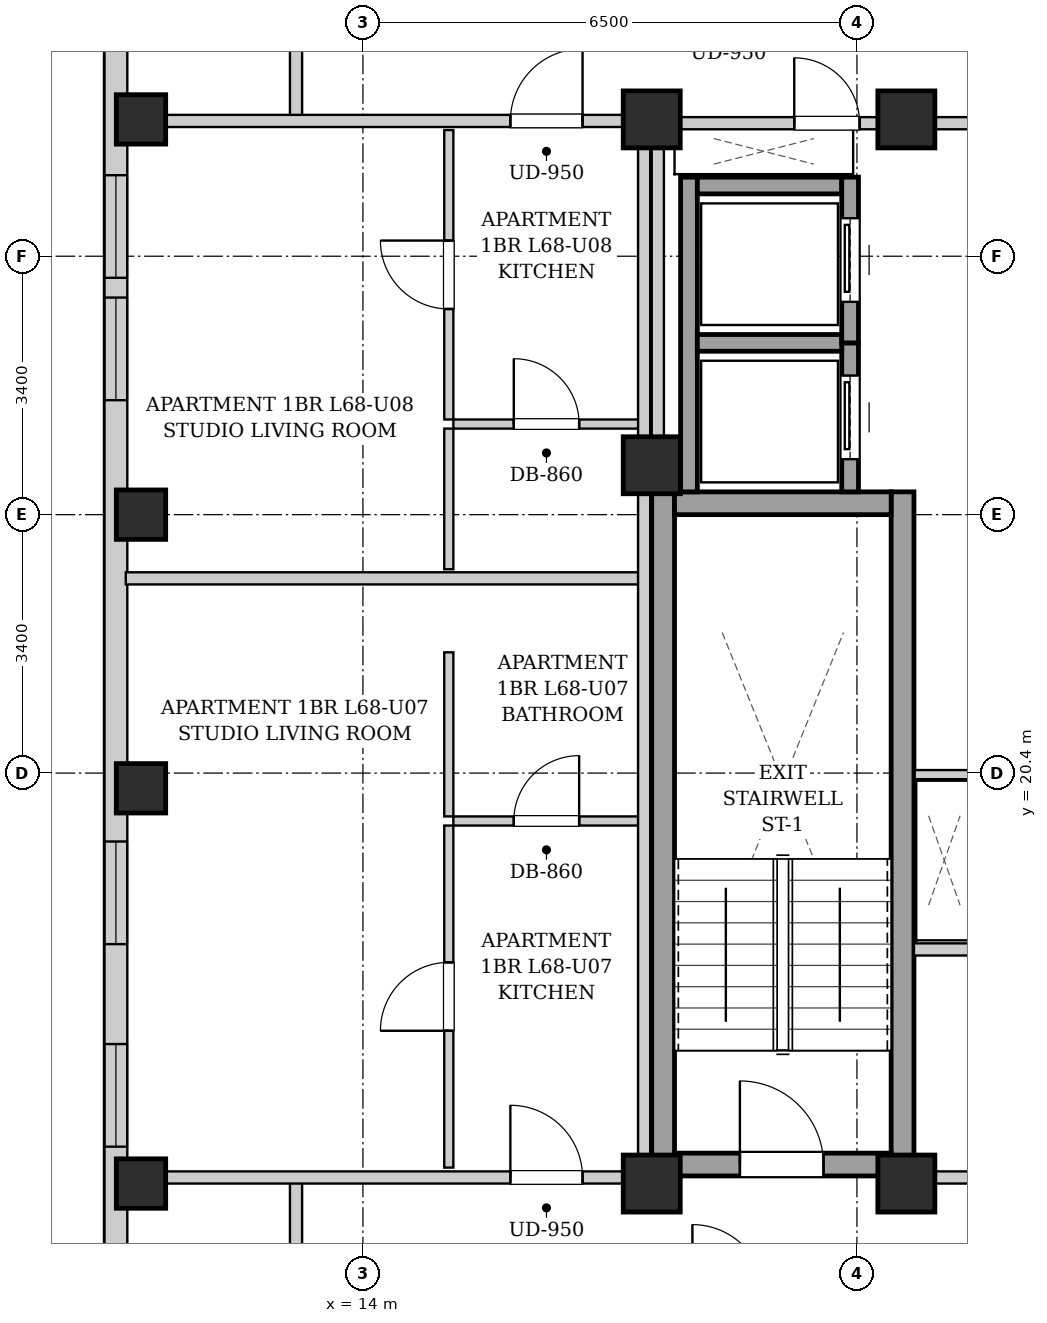
"""IFC4 building model, lengths in metres.
Left out: names, types, materials, properties, quantities, classifications, styles, units other than length and angle.
Written with IfcOpenShell. Run it as: python <this file> out.ifc"""

import sys

from ifc_helpers import new_model, si_unit, direction, frame, frame_2d, origin, origin_2d, place, context, subcontext, project, spatial, rectangle, extrude, element, fill, save


model = new_model("IFC4")
c1 = context("Model", 3, precision=1e-05, world=origin(), true_north=direction((0.0, 1.0)))
c2 = subcontext(c1, "Body", "Model", "MODEL_VIEW")
j1 = project(units=[si_unit("LENGTHUNIT", "METRE"), si_unit("PLANEANGLEUNIT", "RADIAN")], contexts=[c1])
p1 = place(None, origin())
s1 = spatial("IfcSite", under=j1, at=p1, CompositionType="ELEMENT")
p2 = place(p1, origin())
s2 = spatial("IfcBuilding", under=s1, at=p2, CompositionType="ELEMENT")
p3 = place(p2, frame((0.0, 0.0, 234.3)))
s3 = spatial("IfcBuildingStorey", under=s2, at=p3, CompositionType="ELEMENT", Elevation=234.3)
for number, where, z_axis, x_axis in (
    (1, (11.08, 15.0, 0.0), (0.0, 0.0, 1.0), (1.0, 0.0, 0.0)),
    (2, (11.08, 20.2, 0.0), (0.0, 0.0, 1.0), (1.0, 0.0, 0.0)),
    (3, (11.08, 23.8, 0.0), (0.0, 0.0, 1.0), (1.0, 0.0, 0.0)),
    (4, (11.08, 29.0, 0.0), (0.0, 0.0, 1.0), (1.0, 0.0, 0.0)),
):
    element("IfcColumn", number, at=place(p3, frame(where, z_axis=z_axis, x_axis=x_axis)), inside=s3, PredefinedType="COLUMN", context=c2, shape_type="SweptSolid", body=[
        extrude(rectangle(XDim=0.65, YDim=0.65, at=origin_2d()), origin(), (0.0, 0.0, 1.0), 3.4),
    ])
for number, where, z_axis, x_axis in (
    (5, (17.8, 15.0, 0.0), (0.0, 0.0, 1.0), (1.0, 0.0, 0.0)),
    (6, (21.15, 15.0, 0.0), (0.0, 0.0, 1.0), (1.0, 0.0, 0.0)),
    (7, (17.8, 29.0, 0.0), (0.0, 0.0, 1.0), (1.0, 0.0, 0.0)),
    (8, (21.15, 29.0, 0.0), (0.0, 0.0, 1.0), (1.0, 0.0, 0.0)),
    (9, (17.8, 24.45, 0.0), (0.0, 0.0, 1.0), (1.0, 0.0, 0.0)),
):
    element("IfcColumn", number, at=place(p3, frame(where, z_axis=z_axis, x_axis=x_axis)), inside=s3, PredefinedType="COLUMN", context=c2, shape_type="SweptSolid", body=[
        extrude(rectangle(XDim=0.75, YDim=0.75, at=origin_2d()), origin(), (0.0, 0.0, 1.0), 3.4),
    ])
p4 = place(p3, frame((10.75, 6.3, 0.0), z_axis=(0.0, 0.0, 1.0), x_axis=(0.0, 1.0, 0.0)))
e10 = element("IfcWall", 10, at=p4, inside=s3, PredefinedType="SOLIDWALL", context=c2, shape_type="SweptSolid", body=[
    extrude(rectangle(XDim=31.4, YDim=0.3, at=frame_2d((15.7, 0.0))), origin(), (0.0, 0.0, 1.0), 3.14),
])
p5 = place(p4, frame((28.546, 0.0, 0.55)))
e11 = element("IfcOpeningElement", 11, at=p5, cuts=e10, PredefinedType="OPENING", context=c2, shape_type="SweptSolid", body=[
    extrude(rectangle(XDim=1.35, YDim=1.2, at=frame_2d((0.675, 0.6))), frame((0.0, 0.16, 0.0), z_axis=(0.0, -1.0, 0.0), x_axis=(1.0, 0.0, 0.0)), (0.0, 0.0, 1.0), 0.32),
])
p6 = place(p4, frame((11.85, 0.0, 0.55)))
e12 = element("IfcOpeningElement", 12, at=p6, cuts=e10, PredefinedType="OPENING", context=c2, shape_type="SweptSolid", body=[
    extrude(rectangle(XDim=1.35, YDim=1.2, at=frame_2d((0.675, 0.6))), frame((0.0, 0.16, 0.0), z_axis=(0.0, -1.0, 0.0), x_axis=(1.0, 0.0, 0.0)), (0.0, 0.0, 1.0), 0.32),
])
p7 = place(p4, frame((9.185, 0.0, 0.55)))
e13 = element("IfcOpeningElement", 13, at=p7, cuts=e10, PredefinedType="OPENING", context=c2, shape_type="SweptSolid", body=[
    extrude(rectangle(XDim=1.35, YDim=1.2, at=frame_2d((0.675, 0.6))), frame((0.0, 0.16, 0.0), z_axis=(0.0, -1.0, 0.0), x_axis=(1.0, 0.0, 0.0)), (0.0, 0.0, 1.0), 0.32),
])
p8 = place(p4, frame((19.006, 0.0, 0.55)))
e14 = element("IfcOpeningElement", 14, at=p8, cuts=e10, PredefinedType="OPENING", context=c2, shape_type="SweptSolid", body=[
    extrude(rectangle(XDim=1.35, YDim=1.2, at=frame_2d((0.675, 0.6))), frame((0.0, 0.16, 0.0), z_axis=(0.0, -1.0, 0.0), x_axis=(1.0, 0.0, 0.0)), (0.0, 0.0, 1.0), 0.32),
])
p9 = place(p4, frame((20.616, 0.0, 0.55)))
e15 = element("IfcOpeningElement", 15, at=p9, cuts=e10, PredefinedType="OPENING", context=c2, shape_type="SweptSolid", body=[
    extrude(rectangle(XDim=1.35, YDim=1.2, at=frame_2d((0.675, 0.6))), frame((0.0, 0.16, 0.0), z_axis=(0.0, -1.0, 0.0), x_axis=(1.0, 0.0, 0.0)), (0.0, 0.0, 1.0), 0.32),
])
for number, where, z_axis, x_axis in (
    (16, (17.95, 15.1, 0.0), (0.0, 0.0, 1.0), (0.0, 1.0, 0.0)),
    (17, (21.1, 15.1, 0.0), (0.0, 0.0, 1.0), (0.0, 1.0, 0.0)),
):
    element("IfcWall", number, at=place(p3, frame(where, z_axis=z_axis, x_axis=x_axis)), inside=s3, PredefinedType="SHEAR", context=c2, shape_type="SweptSolid", body=[
        extrude(rectangle(XDim=9.0, YDim=0.3, at=frame_2d((4.5, 0.0))), origin(), (0.0, 0.0, 1.0), 3.14),
    ])
p10 = place(p3, frame((18.1, 23.95, 0.0), z_axis=(0.0, 0.0, 1.0), x_axis=(1.0, 0.0, 0.0)))
e18 = element("IfcWall", 18, at=p10, inside=s3, PredefinedType="SHEAR", context=c2, shape_type="SweptSolid", body=[
    extrude(rectangle(XDim=2.85, YDim=0.3, at=frame_2d((1.425, 0.0))), origin(), (0.0, 0.0, 1.0), 3.14),
])
p11 = place(p3, frame((18.1, 15.25, 0.0), z_axis=(0.0, 0.0, 1.0), x_axis=(1.0, 0.0, 0.0)))
e19 = element("IfcWall", 19, at=p11, inside=s3, PredefinedType="SHEAR", context=c2, shape_type="SweptSolid", body=[
    extrude(rectangle(XDim=2.85, YDim=0.3, at=frame_2d((1.425, 0.0))), origin(), (0.0, 0.0, 1.0), 3.14),
])
p12 = place(p11, frame((0.86, 0.0, 0.0)))
e20 = element("IfcOpeningElement", 20, at=p12, cuts=e19, PredefinedType="OPENING", context=c2, shape_type="SweptSolid", body=[
    extrude(rectangle(XDim=1.1, YDim=2.05, at=frame_2d((0.55, 1.025))), frame((0.0, 0.16, 0.0), z_axis=(0.0, -1.0, 0.0), x_axis=(1.0, 0.0, 0.0)), (0.0, 0.0, 1.0), 0.32),
])
p13 = place(p3, frame((18.29, 24.1, 0.0), z_axis=(0.0, 0.0, 1.0), x_axis=(0.0, 1.0, 0.0)))
e21 = element("IfcWall", 21, at=p13, inside=s3, PredefinedType="SHEAR", context=c2, shape_type="SweptSolid", body=[
    extrude(rectangle(XDim=4.14, YDim=0.22, at=frame_2d((2.07, 0.0))), origin(), (0.0, 0.0, 1.0), 3.14),
])
p14 = place(p3, frame((20.41, 24.1, 0.0), z_axis=(0.0, 0.0, 1.0), x_axis=(0.0, 1.0, 0.0)))
e22 = element("IfcWall", 22, at=p14, inside=s3, PredefinedType="SHEAR", context=c2, shape_type="SweptSolid", body=[
    extrude(rectangle(XDim=1.96, YDim=0.22, at=frame_2d((0.98, 0.0))), origin(), (0.0, 0.0, 1.0), 3.14),
])
p15 = place(p14, frame((0.43, 0.0, 0.0)))
e23 = element("IfcOpeningElement", 23, at=p15, cuts=e22, PredefinedType="OPENING", context=c2, shape_type="SweptSolid", body=[
    extrude(rectangle(XDim=1.1, YDim=2.15, at=frame_2d((0.55, 1.075))), frame((0.0, 0.12, 0.0), z_axis=(0.0, -1.0, 0.0), x_axis=(1.0, 0.0, 0.0)), (0.0, 0.0, 1.0), 0.24),
])
for number, where, z_axis, x_axis in (
    (24, (18.4, 26.06, 0.0), (0.0, 0.0, 1.0), (1.0, 0.0, 0.0)),
    (25, (18.4, 28.13, 0.0), (0.0, 0.0, 1.0), (1.0, 0.0, 0.0)),
):
    element("IfcWall", number, at=place(p3, frame(where, z_axis=z_axis, x_axis=x_axis)), inside=s3, PredefinedType="SHEAR", context=c2, shape_type="SweptSolid", body=[
        extrude(rectangle(XDim=1.9, YDim=0.22, at=frame_2d((0.95, 0.0))), origin(), (0.0, 0.0, 1.0), 3.14),
    ])
p16 = place(p3, frame((20.41, 26.06, 0.0), z_axis=(0.0, 0.0, 1.0), x_axis=(0.0, 1.0, 0.0)))
e26 = element("IfcWall", 26, at=p16, inside=s3, PredefinedType="SHEAR", context=c2, shape_type="SweptSolid", body=[
    extrude(rectangle(XDim=2.18, YDim=0.22, at=frame_2d((1.09, 0.0))), origin(), (0.0, 0.0, 1.0), 3.14),
])
p17 = place(p16, frame((0.54, 0.0, 0.0)))
e27 = element("IfcOpeningElement", 27, at=p17, cuts=e26, PredefinedType="OPENING", context=c2, shape_type="SweptSolid", body=[
    extrude(rectangle(XDim=1.1, YDim=2.15, at=frame_2d((0.55, 1.075))), frame((0.0, 0.12, 0.0), z_axis=(0.0, -1.0, 0.0), x_axis=(1.0, 0.0, 0.0)), (0.0, 0.0, 1.0), 0.24),
])
p18 = place(p3, frame((21.25, 15.08, 0.0), z_axis=(0.0, 0.0, 1.0), x_axis=(1.0, 0.0, 0.0)))
e28 = element("IfcWall", 28, at=p18, inside=s3, PredefinedType="PARTITIONING", context=c2, shape_type="SweptSolid", body=[
    extrude(rectangle(XDim=8.5, YDim=0.16, at=frame_2d((4.25, 0.0))), origin(), (0.0, 0.0, 1.0), 2.668),
])
p19 = place(p18, frame((3.725, 0.0, 0.0)))
e29 = element("IfcOpeningElement", 29, at=p19, cuts=e28, PredefinedType="OPENING", context=c2, shape_type="SweptSolid", body=[
    extrude(rectangle(XDim=1.05, YDim=2.05, at=frame_2d((0.525, 1.025))), frame((0.0, 0.09, 0.0), z_axis=(0.0, -1.0, 0.0), x_axis=(1.0, 0.0, 0.0)), (0.0, 0.0, 1.0), 0.18),
])
p20 = place(p3, frame((21.25, 18.08, 0.0), z_axis=(0.0, 0.0, 1.0), x_axis=(1.0, 0.0, 0.0)))
e30 = element("IfcWall", 30, at=p20, inside=s3, PredefinedType="PARTITIONING", context=c2, shape_type="SweptSolid", body=[
    extrude(rectangle(XDim=1.1, YDim=0.16, at=frame_2d((0.55, 0.0))), origin(), (0.0, 0.0, 1.0), 3.14),
])
p21 = place(p3, frame((17.88, 24.12, 0.0), z_axis=(0.0, 0.0, 1.0), x_axis=(0.0, 1.0, 0.0)))
e31 = element("IfcWall", 31, at=p21, inside=s3, PredefinedType="PARTITIONING", context=c2, shape_type="SweptSolid", body=[
    extrude(rectangle(XDim=4.76, YDim=0.16, at=frame_2d((2.38, 0.0))), origin(), (0.0, 0.0, 1.0), 3.14),
])
p22 = place(p3, frame((17.96, 28.95, 0.0), z_axis=(0.0, 0.0, 1.0), x_axis=(1.0, 0.0, 0.0)))
e32 = element("IfcWall", 32, at=p22, inside=s3, PredefinedType="PARTITIONING", context=c2, shape_type="SweptSolid", body=[
    extrude(rectangle(XDim=4.29, YDim=0.16, at=frame_2d((2.145, 0.0))), origin(), (0.0, 0.0, 1.0), 2.668),
])
p23 = place(p22, frame((1.715, 0.0, 0.0)))
e33 = element("IfcOpeningElement", 33, at=p23, cuts=e32, PredefinedType="OPENING", context=c2, shape_type="SweptSolid", body=[
    extrude(rectangle(XDim=0.86, YDim=2.05, at=frame_2d((0.43, 1.025))), frame((0.0, 0.09, 0.0), z_axis=(0.0, -1.0, 0.0), x_axis=(1.0, 0.0, 0.0)), (0.0, 0.0, 1.0), 0.18),
])
p24 = place(p3, frame((22.28, 20.38, 0.0), z_axis=(0.0, 0.0, 1.0), x_axis=(-1.0, 0.0, 0.0)))
e34 = element("IfcWall", 34, at=p24, inside=s3, PredefinedType="PARTITIONING", context=c2, shape_type="SweptSolid", body=[
    extrude(rectangle(XDim=1.02, YDim=0.12, at=frame_2d((0.51, 0.0))), origin(), (0.0, 0.0, 1.0), 3.14),
])
for number, where, z_axis, x_axis in (
    (35, (13.12, 13.51, 0.0), (0.0, 0.0, 1.0), (0.0, 1.0, 0.0)),
    (36, (13.12, 28.98, 0.0), (0.0, 0.0, 1.0), (0.0, 1.0, 0.0)),
):
    element("IfcWall", number, at=place(p3, frame(where, z_axis=z_axis, x_axis=x_axis)), inside=s3, PredefinedType="PARTITIONING", context=c2, shape_type="SweptSolid", body=[
        extrude(rectangle(XDim=1.58, YDim=0.16, at=frame_2d((0.79, 0.0))), origin(), (0.0, 0.0, 1.0), 3.14),
    ])
p25 = place(p3, frame((10.88, 15.08, 0.0), z_axis=(0.0, 0.0, 1.0), x_axis=(1.0, 0.0, 0.0)))
e37 = element("IfcWall", 37, at=p25, inside=s3, PredefinedType="PARTITIONING", context=c2, shape_type="SweptSolid", body=[
    extrude(rectangle(XDim=6.88, YDim=0.16, at=frame_2d((3.44, 0.0))), origin(), (0.0, 0.0, 1.0), 2.668),
])
p26 = place(p25, frame((5.06, 0.0, 0.0)))
e38 = element("IfcOpeningElement", 38, at=p26, cuts=e37, PredefinedType="OPENING", context=c2, shape_type="SweptSolid", body=[
    extrude(rectangle(XDim=0.95, YDim=2.1, at=frame_2d((0.475, 1.05))), frame((0.0, 0.09, 0.0), z_axis=(0.0, -1.0, 0.0), x_axis=(1.0, 0.0, 0.0)), (0.0, 0.0, 1.0), 0.18),
])
p27 = place(p3, frame((10.88, 22.962, 0.0), z_axis=(0.0, 0.0, 1.0), x_axis=(1.0, 0.0, 0.0)))
e39 = element("IfcWall", 39, at=p27, inside=s3, PredefinedType="PARTITIONING", context=c2, shape_type="SweptSolid", body=[
    extrude(rectangle(XDim=6.76, YDim=0.16, at=frame_2d((3.38, 0.0))), origin(), (0.0, 0.0, 1.0), 3.14),
])
p28 = place(p3, frame((15.19, 19.77, 0.0), z_axis=(0.0, 0.0, 1.0), x_axis=(1.0, 0.0, 0.0)))
e40 = element("IfcWall", 40, at=p28, inside=s3, PredefinedType="PARTITIONING", context=c2, shape_type="SweptSolid", body=[
    extrude(rectangle(XDim=2.45, YDim=0.12, at=frame_2d((1.225, 0.0))), origin(), (0.0, 0.0, 1.0), 3.14),
])
p29 = place(p28, frame((0.795, 0.0, 0.0)))
e41 = element("IfcOpeningElement", 41, at=p29, cuts=e40, PredefinedType="OPENING", context=c2, shape_type="SweptSolid", body=[
    extrude(rectangle(XDim=0.86, YDim=2.05, at=frame_2d((0.43, 1.025))), frame((0.0, 0.07, 0.0), z_axis=(0.0, -1.0, 0.0), x_axis=(1.0, 0.0, 0.0)), (0.0, 0.0, 1.0), 0.14),
])
p30 = place(p3, frame((15.13, 19.83, 0.0), z_axis=(0.0, 0.0, 1.0), x_axis=(0.0, 1.0, 0.0)))
e42 = element("IfcWall", 42, at=p30, inside=s3, PredefinedType="PARTITIONING", context=c2, shape_type="SweptSolid", body=[
    extrude(rectangle(XDim=2.159, YDim=0.12, at=frame_2d((1.08, 0.0))), origin(), (0.0, 0.0, 1.0), 3.14),
])
p31 = place(p3, frame((15.13, 15.21, 0.0), z_axis=(0.0, 0.0, 1.0), x_axis=(0.0, 1.0, 0.0)))
e43 = element("IfcWall", 43, at=p31, inside=s3, PredefinedType="PARTITIONING", context=c2, shape_type="SweptSolid", body=[
    extrude(rectangle(XDim=4.5, YDim=0.12, at=frame_2d((2.25, 0.0))), origin(), (0.0, 0.0, 1.0), 3.14),
])
p32 = place(p31, frame((1.8, 0.0, 0.0)))
e44 = element("IfcOpeningElement", 44, at=p32, cuts=e43, PredefinedType="OPENING", context=c2, shape_type="SweptSolid", body=[
    extrude(rectangle(XDim=0.9, YDim=2.05, at=frame_2d((0.45, 1.025))), frame((0.0, 0.07, 0.0), z_axis=(0.0, -1.0, 0.0), x_axis=(1.0, 0.0, 0.0)), (0.0, 0.0, 1.0), 0.14),
])
p33 = place(p3, frame((10.88, 28.98, 0.0), z_axis=(0.0, 0.0, 1.0), x_axis=(1.0, 0.0, 0.0)))
e45 = element("IfcWall", 45, at=p33, inside=s3, PredefinedType="PARTITIONING", context=c2, shape_type="SweptSolid", body=[
    extrude(rectangle(XDim=6.88, YDim=0.16, at=frame_2d((3.44, 0.0))), origin(), (0.0, 0.0, 1.0), 2.668),
])
p34 = place(p33, frame((5.06, 0.0, 0.0)))
e46 = element("IfcOpeningElement", 46, at=p34, cuts=e45, PredefinedType="OPENING", context=c2, shape_type="SweptSolid", body=[
    extrude(rectangle(XDim=0.95, YDim=2.1, at=frame_2d((0.475, 1.05))), frame((0.0, 0.09, 0.0), z_axis=(0.0, -1.0, 0.0), x_axis=(1.0, 0.0, 0.0)), (0.0, 0.0, 1.0), 0.18),
])
p35 = place(p3, frame((15.19, 24.992, 0.0), z_axis=(0.0, 0.0, 1.0), x_axis=(1.0, 0.0, 0.0)))
e47 = element("IfcWall", 47, at=p35, inside=s3, PredefinedType="PARTITIONING", context=c2, shape_type="SweptSolid", body=[
    extrude(rectangle(XDim=2.45, YDim=0.12, at=frame_2d((1.225, 0.0))), origin(), (0.0, 0.0, 1.0), 3.14),
])
p36 = place(p35, frame((0.795, 0.0, 0.0)))
e48 = element("IfcOpeningElement", 48, at=p36, cuts=e47, PredefinedType="OPENING", context=c2, shape_type="SweptSolid", body=[
    extrude(rectangle(XDim=0.86, YDim=2.05, at=frame_2d((0.43, 1.025))), frame((0.0, 0.07, 0.0), z_axis=(0.0, -1.0, 0.0), x_axis=(1.0, 0.0, 0.0)), (0.0, 0.0, 1.0), 0.14),
])
p37 = place(p3, frame((15.13, 23.082, 0.0), z_axis=(0.0, 0.0, 1.0), x_axis=(0.0, 1.0, 0.0)))
e49 = element("IfcWall", 49, at=p37, inside=s3, PredefinedType="PARTITIONING", context=c2, shape_type="SweptSolid", body=[
    extrude(rectangle(XDim=1.85, YDim=0.12, at=frame_2d((0.925, 0.0))), origin(), (0.0, 0.0, 1.0), 3.14),
])
p38 = place(p3, frame((15.13, 25.052, 0.0), z_axis=(0.0, 0.0, 1.0), x_axis=(0.0, 1.0, 0.0)))
e50 = element("IfcWall", 50, at=p38, inside=s3, PredefinedType="PARTITIONING", context=c2, shape_type="SweptSolid", body=[
    extrude(rectangle(XDim=3.808, YDim=0.12, at=frame_2d((1.904, 0.0))), origin(), (0.0, 0.0, 1.0), 3.14),
])
p39 = place(p38, frame((1.454, 0.0, 0.0)))
e51 = element("IfcOpeningElement", 51, at=p39, cuts=e50, PredefinedType="OPENING", context=c2, shape_type="SweptSolid", body=[
    extrude(rectangle(XDim=0.9, YDim=2.05, at=frame_2d((0.45, 1.025))), frame((0.0, 0.07, 0.0), z_axis=(0.0, -1.0, 0.0), x_axis=(1.0, 0.0, 0.0)), (0.0, 0.0, 1.0), 0.14),
])
p40 = place(p3, frame((17.7, 15.02, 0.0), z_axis=(0.0, 0.0, 1.0), x_axis=(0.0, 1.0, 0.0)))
e52 = element("IfcWall", 52, at=p40, inside=s3, PredefinedType="PARTITIONING", context=c2, shape_type="SweptSolid", body=[
    extrude(rectangle(XDim=13.98, YDim=0.16, at=frame_2d((6.99, 0.0))), origin(), (0.0, 0.0, 1.0), 3.14),
])
p41 = place(p12, origin())
e53 = element("IfcDoor", 53, at=p41, inside=s3, OperationType="SINGLE_SWING_LEFT", PredefinedType="DOOR", context=c2, shape_type="SweptSolid", body=[
    extrude(rectangle(XDim=1.1, YDim=2.05, at=frame_2d((0.55, 1.025))), frame((0.0, 0.025, 0.0), z_axis=(0.0, -1.0, 0.0), x_axis=(1.0, 0.0, 0.0)), (0.0, 0.0, 1.0), 0.05),
])
fill(e20, e53)
p42 = place(p15, origin())
e54 = element("IfcDoor", 54, at=p42, inside=s3, OperationType="SLIDING_TO_LEFT", PredefinedType="DOOR", context=c2, shape_type="SweptSolid", body=[
    extrude(rectangle(XDim=1.1, YDim=2.15, at=frame_2d((0.55, 1.075))), frame((0.0, 0.025, 0.0), z_axis=(0.0, -1.0, 0.0), x_axis=(1.0, 0.0, 0.0)), (0.0, 0.0, 1.0), 0.05),
])
fill(e23, e54)
p43 = place(p17, origin())
e55 = element("IfcDoor", 55, at=p43, inside=s3, OperationType="SLIDING_TO_LEFT", PredefinedType="DOOR", context=c2, shape_type="SweptSolid", body=[
    extrude(rectangle(XDim=1.1, YDim=2.15, at=frame_2d((0.55, 1.075))), frame((0.0, 0.025, 0.0), z_axis=(0.0, -1.0, 0.0), x_axis=(1.0, 0.0, 0.0)), (0.0, 0.0, 1.0), 0.05),
])
fill(e27, e55)
p44 = place(p23, origin())
e56 = element("IfcDoor", 56, at=p44, inside=s3, OperationType="SINGLE_SWING_LEFT", PredefinedType="DOOR", context=c2, shape_type="SweptSolid", body=[
    extrude(rectangle(XDim=0.86, YDim=2.05, at=frame_2d((0.43, 1.025))), frame((0.0, 0.025, 0.0), z_axis=(0.0, -1.0, 0.0), x_axis=(1.0, 0.0, 0.0)), (0.0, 0.0, 1.0), 0.05),
])
fill(e33, e56)
p45 = place(p26, origin())
e57 = element("IfcDoor", 57, at=p45, inside=s3, OperationType="SINGLE_SWING_LEFT", PredefinedType="DOOR", context=c2, shape_type="SweptSolid", body=[
    extrude(rectangle(XDim=0.95, YDim=2.1, at=frame_2d((0.475, 1.05))), frame((0.0, 0.025, 0.0), z_axis=(0.0, -1.0, 0.0), x_axis=(1.0, 0.0, 0.0)), (0.0, 0.0, 1.0), 0.05),
])
fill(e38, e57)
p46 = place(p29, origin())
e58 = element("IfcDoor", 58, at=p46, inside=s3, OperationType="SINGLE_SWING_RIGHT", PredefinedType="DOOR", context=c2, shape_type="SweptSolid", body=[
    extrude(rectangle(XDim=0.86, YDim=2.05, at=frame_2d((0.43, 1.025))), frame((0.0, 0.025, 0.0), z_axis=(0.0, -1.0, 0.0), x_axis=(1.0, 0.0, 0.0)), (0.0, 0.0, 1.0), 0.05),
])
fill(e41, e58)
p47 = place(p32, origin())
e59 = element("IfcDoor", 59, at=p47, inside=s3, OperationType="SINGLE_SWING_LEFT", PredefinedType="DOOR", context=c2, shape_type="SweptSolid", body=[
    extrude(rectangle(XDim=0.9, YDim=2.05, at=frame_2d((0.45, 1.025))), frame((0.0, 0.025, 0.0), z_axis=(0.0, -1.0, 0.0), x_axis=(1.0, 0.0, 0.0)), (0.0, 0.0, 1.0), 0.05),
])
fill(e44, e59)
p48 = place(p34, origin())
e60 = element("IfcDoor", 60, at=p48, inside=s3, OperationType="SINGLE_SWING_RIGHT", PredefinedType="DOOR", context=c2, shape_type="SweptSolid", body=[
    extrude(rectangle(XDim=0.95, YDim=2.1, at=frame_2d((0.475, 1.05))), frame((0.0, 0.025, 0.0), z_axis=(0.0, -1.0, 0.0), x_axis=(1.0, 0.0, 0.0)), (0.0, 0.0, 1.0), 0.05),
])
fill(e46, e60)
p49 = place(p36, origin())
e61 = element("IfcDoor", 61, at=p49, inside=s3, OperationType="SINGLE_SWING_LEFT", PredefinedType="DOOR", context=c2, shape_type="SweptSolid", body=[
    extrude(rectangle(XDim=0.86, YDim=2.05, at=frame_2d((0.43, 1.025))), frame((0.0, 0.025, 0.0), z_axis=(0.0, -1.0, 0.0), x_axis=(1.0, 0.0, 0.0)), (0.0, 0.0, 1.0), 0.05),
])
fill(e48, e61)
p50 = place(p39, origin())
e62 = element("IfcDoor", 62, at=p50, inside=s3, OperationType="SINGLE_SWING_RIGHT", PredefinedType="DOOR", context=c2, shape_type="SweptSolid", body=[
    extrude(rectangle(XDim=0.9, YDim=2.05, at=frame_2d((0.45, 1.025))), frame((0.0, 0.025, 0.0), z_axis=(0.0, -1.0, 0.0), x_axis=(1.0, 0.0, 0.0)), (0.0, 0.0, 1.0), 0.05),
])
fill(e51, e62)
p51 = place(p6, origin())
e63 = element("IfcWindow", 63, at=p51, inside=s3, PartitioningType="SINGLE_PANEL", PredefinedType="WINDOW", context=c2, shape_type="SweptSolid", body=[
    extrude(rectangle(XDim=1.35, YDim=1.2, at=frame_2d((0.675, 0.6))), frame((0.0, 0.03, 0.0), z_axis=(0.0, -1.0, 0.0), x_axis=(1.0, 0.0, 0.0)), (0.0, 0.0, 1.0), 0.06),
])
fill(e12, e63)
p52 = place(p7, origin())
e64 = element("IfcWindow", 64, at=p52, inside=s3, PartitioningType="SINGLE_PANEL", PredefinedType="WINDOW", context=c2, shape_type="SweptSolid", body=[
    extrude(rectangle(XDim=1.35, YDim=1.2, at=frame_2d((0.675, 0.6))), frame((0.0, 0.03, 0.0), z_axis=(0.0, -1.0, 0.0), x_axis=(1.0, 0.0, 0.0)), (0.0, 0.0, 1.0), 0.06),
])
fill(e13, e64)
p53 = place(p8, origin())
e65 = element("IfcWindow", 65, at=p53, inside=s3, PartitioningType="SINGLE_PANEL", PredefinedType="WINDOW", context=c2, shape_type="SweptSolid", body=[
    extrude(rectangle(XDim=1.35, YDim=1.2, at=frame_2d((0.675, 0.6))), frame((0.0, 0.03, 0.0), z_axis=(0.0, -1.0, 0.0), x_axis=(1.0, 0.0, 0.0)), (0.0, 0.0, 1.0), 0.06),
])
fill(e14, e65)
p54 = place(p9, origin())
e66 = element("IfcWindow", 66, at=p54, inside=s3, PartitioningType="SINGLE_PANEL", PredefinedType="WINDOW", context=c2, shape_type="SweptSolid", body=[
    extrude(rectangle(XDim=1.35, YDim=1.2, at=frame_2d((0.675, 0.6))), frame((0.0, 0.03, 0.0), z_axis=(0.0, -1.0, 0.0), x_axis=(1.0, 0.0, 0.0)), (0.0, 0.0, 1.0), 0.06),
])
fill(e15, e66)
save(model, sys.argv[1])
